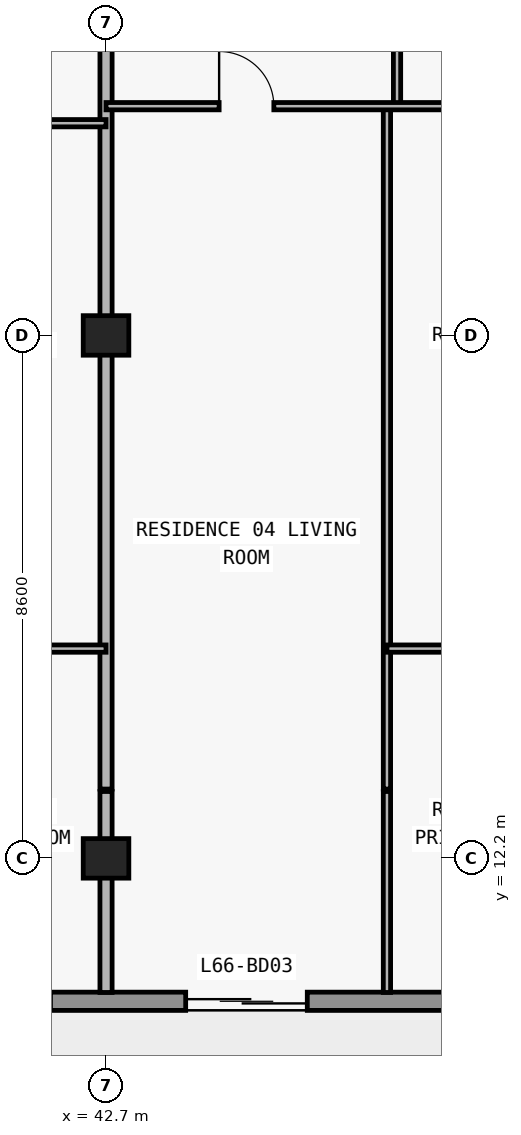
"""IFC4 building model, lengths in metres.
Left out: names, types, materials, properties, quantities, classifications, styles, units other than length and angle.
Written with IfcOpenShell. Run it as: python <this file> out.ifc"""

import sys

from ifc_helpers import new_model, si_unit, direction, frame, frame_2d, origin, origin_2d, place, context, subcontext, project, spatial, rectangle, extrude, element, fill, save


model = new_model("IFC4")
c1 = context("Model", 3, precision=1e-05, world=origin(), true_north=direction((0.0, 1.0)))
c2 = subcontext(c1, "Body", "Model", "MODEL_VIEW")
j1 = project(units=[si_unit("LENGTHUNIT", "METRE"), si_unit("PLANEANGLEUNIT", "RADIAN")], contexts=[c1])
p1 = place(None, origin())
s1 = spatial("IfcSite", under=j1, at=p1, CompositionType="ELEMENT")
p2 = place(p1, origin())
s2 = spatial("IfcBuilding", under=s1, at=p2, CompositionType="ELEMENT")
p3 = place(p2, frame((0.0, 0.0, 236.4)))
s3 = spatial("IfcBuildingStorey", under=s2, at=p3, CompositionType="ELEMENT", Elevation=236.4)
for number, where, z_axis, x_axis in (
    (1, (42.7, 12.2, 0.0), (0.0, 0.0, 1.0), (1.0, 0.0, 0.0)),
    (2, (42.7, 20.8, 0.0), (0.0, 0.0, 1.0), (1.0, 0.0, 0.0)),
):
    element("IfcColumn", number, at=place(p3, frame(where, z_axis=z_axis, x_axis=x_axis)), inside=s3, PredefinedType="COLUMN", context=c2, shape_type="SweptSolid", body=[
        extrude(rectangle(XDim=0.75, YDim=0.65, at=origin_2d()), origin(), (0.0, 0.0, 1.0), 3.05),
    ])
p4 = place(p3, frame((65.7, 9.85, 0.0), z_axis=(0.0, 0.0, 1.0), x_axis=(-1.0, 0.0, 0.0)))
e3 = element("IfcWall", 3, at=p4, inside=s3, PredefinedType="STANDARD", context=c2, shape_type="SweptSolid", body=[
    extrude(rectangle(XDim=53.6, YDim=0.3, at=frame_2d((26.8, 0.0))), origin(), (0.0, 0.0, 1.0), 3.05),
])
p5 = place(p4, frame((49.5, 0.0, 0.0)))
e4 = element("IfcOpeningElement", 4, at=p5, cuts=e3, PredefinedType="OPENING", context=c2, shape_type="SweptSolid", body=[
    extrude(rectangle(XDim=2.0, YDim=2.3, at=frame_2d((1.0, 1.15))), frame((0.0, 0.16, 0.0), z_axis=(0.0, -1.0, 0.0), x_axis=(1.0, 0.0, 0.0)), (0.0, 0.0, 1.0), 0.32),
])
p6 = place(p4, frame((42.1, 0.0, 0.85)))
e5 = element("IfcOpeningElement", 5, at=p6, cuts=e3, PredefinedType="OPENING", context=c2, shape_type="SweptSolid", body=[
    extrude(rectangle(XDim=2.2, YDim=1.55, at=frame_2d((1.1, 0.775))), frame((0.0, 0.16, 0.0), z_axis=(0.0, -1.0, 0.0), x_axis=(1.0, 0.0, 0.0)), (0.0, 0.0, 1.0), 0.32),
])
p7 = place(p4, frame((35.69, 0.0, 0.0)))
e6 = element("IfcOpeningElement", 6, at=p7, cuts=e3, PredefinedType="OPENING", context=c2, shape_type="SweptSolid", body=[
    extrude(rectangle(XDim=2.0, YDim=2.3, at=frame_2d((1.0, 1.15))), frame((0.0, 0.16, 0.0), z_axis=(0.0, -1.0, 0.0), x_axis=(1.0, 0.0, 0.0)), (0.0, 0.0, 1.0), 0.32),
])
p8 = place(p4, frame((31.59, 0.0, 0.85)))
e7 = element("IfcOpeningElement", 7, at=p8, cuts=e3, PredefinedType="OPENING", context=c2, shape_type="SweptSolid", body=[
    extrude(rectangle(XDim=1.8, YDim=1.55, at=frame_2d((0.9, 0.775))), frame((0.0, 0.16, 0.0), z_axis=(0.0, -1.0, 0.0), x_axis=(1.0, 0.0, 0.0)), (0.0, 0.0, 1.0), 0.32),
])
p9 = place(p4, frame((23.914, 0.0, 0.85)))
e8 = element("IfcOpeningElement", 8, at=p9, cuts=e3, PredefinedType="OPENING", context=c2, shape_type="SweptSolid", body=[
    extrude(rectangle(XDim=2.2, YDim=1.55, at=frame_2d((1.1, 0.775))), frame((0.0, 0.16, 0.0), z_axis=(0.0, -1.0, 0.0), x_axis=(1.0, 0.0, 0.0)), (0.0, 0.0, 1.0), 0.32),
])
p10 = place(p4, frame((19.69, 0.0, 0.0)))
e9 = element("IfcOpeningElement", 9, at=p10, cuts=e3, PredefinedType="OPENING", context=c2, shape_type="SweptSolid", body=[
    extrude(rectangle(XDim=2.0, YDim=2.3, at=frame_2d((1.0, 1.15))), frame((0.0, 0.16, 0.0), z_axis=(0.0, -1.0, 0.0), x_axis=(1.0, 0.0, 0.0)), (0.0, 0.0, 1.0), 0.32),
])
p11 = place(p4, frame((15.59, 0.0, 0.85)))
e10 = element("IfcOpeningElement", 10, at=p11, cuts=e3, PredefinedType="OPENING", context=c2, shape_type="SweptSolid", body=[
    extrude(rectangle(XDim=1.8, YDim=1.55, at=frame_2d((0.9, 0.775))), frame((0.0, 0.16, 0.0), z_axis=(0.0, -1.0, 0.0), x_axis=(1.0, 0.0, 0.0)), (0.0, 0.0, 1.0), 0.32),
])
p12 = place(p4, frame((11.69, 0.0, 0.0)))
e11 = element("IfcOpeningElement", 11, at=p12, cuts=e3, PredefinedType="OPENING", context=c2, shape_type="SweptSolid", body=[
    extrude(rectangle(XDim=2.0, YDim=2.3, at=frame_2d((1.0, 1.15))), frame((0.0, 0.16, 0.0), z_axis=(0.0, -1.0, 0.0), x_axis=(1.0, 0.0, 0.0)), (0.0, 0.0, 1.0), 0.32),
])
p13 = place(p4, frame((7.01, 0.0, 0.65)))
e12 = element("IfcOpeningElement", 12, at=p13, cuts=e3, PredefinedType="OPENING", context=c2, shape_type="SweptSolid", body=[
    extrude(rectangle(XDim=2.6, YDim=1.85, at=frame_2d((1.3, 0.925))), frame((0.0, 0.16, 0.0), z_axis=(0.0, -1.0, 0.0), x_axis=(1.0, 0.0, 0.0)), (0.0, 0.0, 1.0), 0.32),
])
p14 = place(p4, frame((2.0, 0.0, 0.85)))
e13 = element("IfcOpeningElement", 13, at=p14, cuts=e3, PredefinedType="OPENING", context=c2, shape_type="SweptSolid", body=[
    extrude(rectangle(XDim=2.2, YDim=1.55, at=frame_2d((1.1, 0.775))), frame((0.0, 0.16, 0.0), z_axis=(0.0, -1.0, 0.0), x_axis=(1.0, 0.0, 0.0)), (0.0, 0.0, 1.0), 0.32),
])
p15 = place(p3, frame((42.7, 9.995, 0.0), z_axis=(0.0, 0.0, 1.0), x_axis=(0.0, 1.0, 0.0)))
e14 = element("IfcWall", 14, at=p15, inside=s3, PredefinedType="PARTITIONING", context=c2, shape_type="SweptSolid", body=[
    extrude(rectangle(XDim=3.305, YDim=0.2, at=frame_2d((1.652, 0.0))), origin(), (0.0, 0.0, 1.0), 2.263),
])
p16 = place(p3, frame((42.7, 13.34, 0.0), z_axis=(0.0, 0.0, 1.0), x_axis=(0.0, 1.0, 0.0)))
e15 = element("IfcWall", 15, at=p16, inside=s3, PredefinedType="PARTITIONING", context=c2, shape_type="SweptSolid", body=[
    extrude(rectangle(XDim=16.06, YDim=0.2, at=frame_2d((8.03, 0.0))), origin(), (0.0, 0.0, 1.0), 2.263),
])
p17 = place(p3, frame((47.32, 9.995, 0.0), z_axis=(0.0, 0.0, 1.0), x_axis=(0.0, 1.0, 0.0)))
e16 = element("IfcWall", 16, at=p17, inside=s3, PredefinedType="PARTITIONING", context=c2, shape_type="SweptSolid", body=[
    extrude(rectangle(XDim=3.305, YDim=0.12, at=frame_2d((1.652, 0.0))), origin(), (0.0, 0.0, 1.0), 3.05),
])
p18 = place(p3, frame((47.32, 13.34, 0.0), z_axis=(0.0, 0.0, 1.0), x_axis=(0.0, 1.0, 0.0)))
e17 = element("IfcWall", 17, at=p18, inside=s3, PredefinedType="PARTITIONING", context=c2, shape_type="SweptSolid", body=[
    extrude(rectangle(XDim=11.23, YDim=0.12, at=frame_2d((5.615, 0.0))), origin(), (0.0, 0.0, 1.0), 3.05),
])
p19 = place(p3, frame((47.486, 24.575, 0.0), z_axis=(0.0, 0.0, 1.0), x_axis=(0.0, 1.0, 0.0)))
e18 = element("IfcWall", 18, at=p19, inside=s3, PredefinedType="PARTITIONING", context=c2, shape_type="SweptSolid", body=[
    extrude(rectangle(XDim=4.825, YDim=0.12, at=frame_2d((2.413, 0.0))), origin(), (0.0, 0.0, 1.0), 3.05),
])
p20 = place(p19, frame((1.962, 0.0, 0.0)))
e19 = element("IfcOpeningElement", 19, at=p20, cuts=e18, PredefinedType="OPENING", context=c2, shape_type="SweptSolid", body=[
    extrude(rectangle(XDim=0.9, YDim=2.15, at=frame_2d((0.45, 1.075))), frame((0.0, 0.07, 0.0), z_axis=(0.0, -1.0, 0.0), x_axis=(1.0, 0.0, 0.0)), (0.0, 0.0, 1.0), 0.14),
])
p21 = place(p3, frame((38.672, 15.65, 0.0), z_axis=(0.0, 0.0, 1.0), x_axis=(1.0, 0.0, 0.0)))
e20 = element("IfcWall", 20, at=p21, inside=s3, PredefinedType="PARTITIONING", context=c2, shape_type="SweptSolid", body=[
    extrude(rectangle(XDim=4.028, YDim=0.12, at=frame_2d((2.014, 0.0))), origin(), (0.0, 0.0, 1.0), 3.05),
])
p22 = place(p21, frame((1.564, 0.0, 0.0)))
e21 = element("IfcOpeningElement", 21, at=p22, cuts=e20, PredefinedType="OPENING", context=c2, shape_type="SweptSolid", body=[
    extrude(rectangle(XDim=0.9, YDim=2.15, at=frame_2d((0.45, 1.075))), frame((0.0, 0.07, 0.0), z_axis=(0.0, -1.0, 0.0), x_axis=(1.0, 0.0, 0.0)), (0.0, 0.0, 1.0), 0.14),
])
p23 = place(p3, frame((47.32, 15.65, 0.0), z_axis=(0.0, 0.0, 1.0), x_axis=(1.0, 0.0, 0.0)))
e22 = element("IfcWall", 22, at=p23, inside=s3, PredefinedType="PARTITIONING", context=c2, shape_type="SweptSolid", body=[
    extrude(rectangle(XDim=3.78, YDim=0.12, at=frame_2d((1.89, 0.0))), origin(), (0.0, 0.0, 1.0), 3.05),
])
p24 = place(p23, frame((1.44, 0.0, 0.0)))
e23 = element("IfcOpeningElement", 23, at=p24, cuts=e22, PredefinedType="OPENING", context=c2, shape_type="SweptSolid", body=[
    extrude(rectangle(XDim=0.9, YDim=2.15, at=frame_2d((0.45, 1.075))), frame((0.0, 0.07, 0.0), z_axis=(0.0, -1.0, 0.0), x_axis=(1.0, 0.0, 0.0)), (0.0, 0.0, 1.0), 0.14),
])
p25 = place(p3, frame((35.1, 24.29, 0.0), z_axis=(0.0, 0.0, 1.0), x_axis=(1.0, 0.0, 0.0)))
e24 = element("IfcWall", 24, at=p25, inside=s3, PredefinedType="PARTITIONING", context=c2, shape_type="SweptSolid", body=[
    extrude(rectangle(XDim=7.6, YDim=0.12, at=frame_2d((3.8, 0.0))), origin(), (0.0, 0.0, 1.0), 3.05),
])
p26 = place(p25, frame((1.336, 0.0, 0.0)))
e25 = element("IfcOpeningElement", 25, at=p26, cuts=e24, PredefinedType="OPENING", context=c2, shape_type="SweptSolid", body=[
    extrude(rectangle(XDim=0.9, YDim=2.15, at=frame_2d((0.45, 1.075))), frame((0.0, 0.07, 0.0), z_axis=(0.0, -1.0, 0.0), x_axis=(1.0, 0.0, 0.0)), (0.0, 0.0, 1.0), 0.14),
])
p27 = place(p25, frame((5.402, 0.0, 0.0)))
e26 = element("IfcOpeningElement", 26, at=p27, cuts=e24, PredefinedType="OPENING", context=c2, shape_type="SweptSolid", body=[
    extrude(rectangle(XDim=0.9, YDim=2.15, at=frame_2d((0.45, 1.075))), frame((0.0, 0.07, 0.0), z_axis=(0.0, -1.0, 0.0), x_axis=(1.0, 0.0, 0.0)), (0.0, 0.0, 1.0), 0.14),
])
p28 = place(p3, frame((42.7, 24.57, 0.0), z_axis=(0.0, 0.0, 1.0), x_axis=(1.0, 0.0, 0.0)))
e27 = element("IfcWall", 27, at=p28, inside=s3, PredefinedType="PARTITIONING", context=c2, shape_type="SweptSolid", body=[
    extrude(rectangle(XDim=8.18, YDim=0.12, at=frame_2d((4.09, 0.0))), origin(), (0.0, 0.0, 1.0), 3.05),
])
p29 = place(p28, frame((1.86, 0.0, 0.0)))
e28 = element("IfcOpeningElement", 28, at=p29, cuts=e27, PredefinedType="OPENING", context=c2, shape_type="SweptSolid", body=[
    extrude(rectangle(XDim=0.9, YDim=2.15, at=frame_2d((0.45, 1.075))), frame((0.0, 0.07, 0.0), z_axis=(0.0, -1.0, 0.0), x_axis=(1.0, 0.0, 0.0)), (0.0, 0.0, 1.0), 0.14),
])
p30 = place(p28, frame((6.033, 0.0, 0.0)))
e29 = element("IfcOpeningElement", 29, at=p30, cuts=e27, PredefinedType="OPENING", context=c2, shape_type="SweptSolid", body=[
    extrude(rectangle(XDim=0.9, YDim=2.15, at=frame_2d((0.45, 1.075))), frame((0.0, 0.07, 0.0), z_axis=(0.0, -1.0, 0.0), x_axis=(1.0, 0.0, 0.0)), (0.0, 0.0, 1.0), 0.14),
])
p31 = place(p10, origin())
e30 = element("IfcDoor", 30, at=p31, inside=s3, OperationType="DOUBLE_DOOR_SLIDING", PredefinedType="DOOR", context=c2, shape_type="SweptSolid", body=[
    extrude(rectangle(XDim=2.0, YDim=2.3, at=frame_2d((1.0, 1.15))), frame((0.0, 0.025, 0.0), z_axis=(0.0, -1.0, 0.0), x_axis=(1.0, 0.0, 0.0)), (0.0, 0.0, 1.0), 0.05),
])
fill(e9, e30)
p32 = place(p29, origin())
e31 = element("IfcDoor", 31, at=p32, inside=s3, OperationType="SINGLE_SWING_LEFT", PredefinedType="DOOR", context=c2, shape_type="SweptSolid", body=[
    extrude(rectangle(XDim=0.9, YDim=2.15, at=frame_2d((0.45, 1.075))), frame((0.0, 0.025, 0.0), z_axis=(0.0, -1.0, 0.0), x_axis=(1.0, 0.0, 0.0)), (0.0, 0.0, 1.0), 0.05),
])
fill(e28, e31)
save(model, sys.argv[1])
